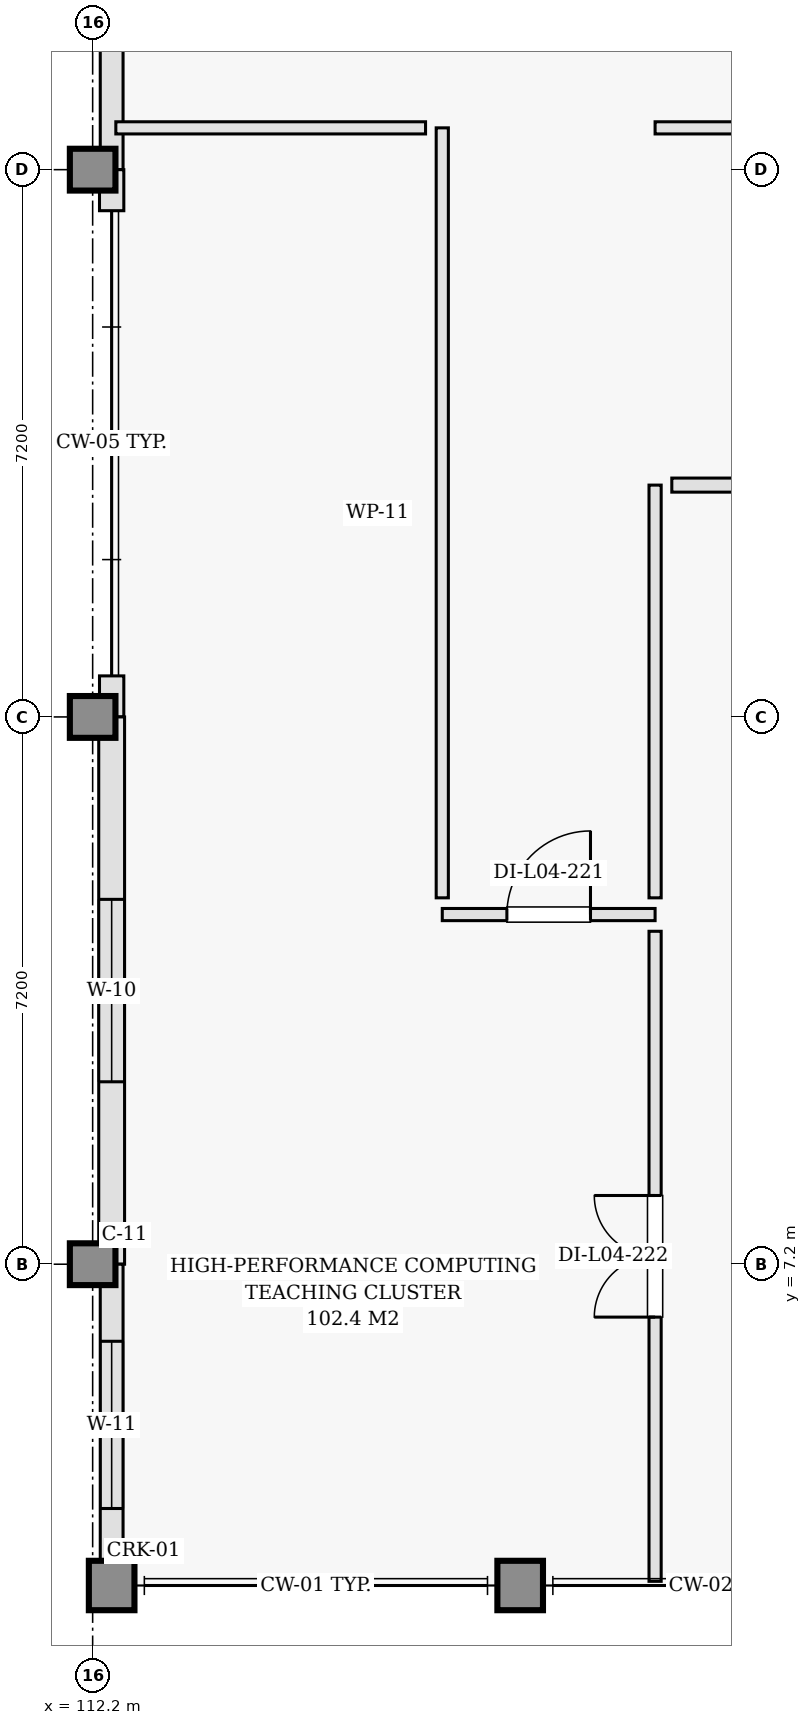
"""IFC4 building model, lengths in metres.
Left out: names, types, materials, properties, quantities, classifications, styles, units other than length and angle.
Written with IfcOpenShell. Run it as: python <this file> out.ifc"""

import sys

from ifc_helpers import new_model, si_unit, direction, frame, frame_2d, origin, origin_2d, place, context, subcontext, project, spatial, rectangle, extrude, element, fill, save


model = new_model("IFC4")
c1 = context("Model", 3, precision=1e-05, world=origin(), true_north=direction((0.0, 1.0)))
c2 = subcontext(c1, "Body", "Model", "MODEL_VIEW")
j1 = project(units=[si_unit("LENGTHUNIT", "METRE"), si_unit("PLANEANGLEUNIT", "RADIAN")], contexts=[c1])
p1 = place(None, origin())
s1 = spatial("IfcSite", under=j1, at=p1, CompositionType="ELEMENT")
p2 = place(p1, origin())
s2 = spatial("IfcBuilding", under=s1, at=p2, CompositionType="ELEMENT")
p3 = place(p2, frame((0.0, 0.0, 18.0)))
s3 = spatial("IfcBuildingStorey", under=s2, at=p3, CompositionType="ELEMENT", Elevation=18.0)
for number, where, z_axis, x_axis in (
    (1, (112.2, 7.2, 0.0), (0.0, 0.0, 1.0), (1.0, 0.0, 0.0)),
    (2, (112.2, 14.4, 0.0), (0.0, 0.0, 1.0), (1.0, 0.0, 0.0)),
    (3, (112.2, 21.6, 0.0), (0.0, 0.0, 1.0), (1.0, 0.0, 0.0)),
):
    element("IfcColumn", number, at=place(p3, frame(where, z_axis=z_axis, x_axis=x_axis)), inside=s3, PredefinedType="COLUMN", context=c2, shape_type="SweptSolid", body=[
        extrude(rectangle(XDim=0.55, YDim=0.55, at=origin_2d()), origin(), (0.0, 0.0, 1.0), 4.2),
    ])
for number, where, z_axis, x_axis in (
    (4, (112.45, 2.973, 0.0), (0.0, -0.272, 0.962), (1.0, 0.0, 0.0)),
    (5, (117.825, 2.973, 0.0), (0.0, -0.272, 0.962), (1.0, 0.0, 0.0)),
):
    element("IfcColumn", number, at=place(p3, frame(where, z_axis=z_axis, x_axis=x_axis)), inside=s3, PredefinedType="USERDEFINED", context=c2, shape_type="SweptSolid", body=[
        extrude(rectangle(XDim=0.45, YDim=0.65, at=origin_2d()), origin(), (0.0, 0.0, 1.0), 4.365),
    ])
p4 = place(p3, frame((112.45, 28.8, 0.0), z_axis=(0.0, 0.0, 1.0), x_axis=(0.0, -1.0, 0.0)))
e6 = element("IfcWall", 6, at=p4, inside=s3, PredefinedType="SOLIDWALL", context=c2, shape_type="SweptSolid", body=[
    extrude(rectangle(XDim=7.2, YDim=0.3, at=frame_2d((3.6, 0.0))), origin(), (0.0, 0.0, 1.0), 3.125),
])
p5 = place(p4, frame((1.5, 0.0, 2.005)))
e7 = element("IfcOpeningElement", 7, at=p5, cuts=e6, PredefinedType="OPENING", context=c2, shape_type="SweptSolid", body=[
    extrude(rectangle(XDim=1.8, YDim=0.9, at=frame_2d((0.9, 0.45))), frame((0.0, 0.16, 0.0), z_axis=(0.0, -1.0, 0.0), x_axis=(1.0, 0.0, 0.0)), (0.0, 0.0, 1.0), 0.32),
])
p6 = place(p4, frame((4.325, 0.0, 2.005)))
e8 = element("IfcOpeningElement", 8, at=p6, cuts=e6, PredefinedType="OPENING", context=c2, shape_type="SweptSolid", body=[
    extrude(rectangle(XDim=0.95, YDim=0.9, at=frame_2d((0.475, 0.45))), frame((0.0, 0.16, 0.0), z_axis=(0.0, -1.0, 0.0), x_axis=(1.0, 0.0, 0.0)), (0.0, 0.0, 1.0), 0.32),
])
for number, where, z_axis, x_axis in (
    (9, (112.45, 21.6, 0.0), (0.0, 0.0, 1.0), (0.0, -1.0, 0.0)),
    (10, (112.45, 14.94, 0.0), (0.0, 0.0, 1.0), (0.0, -1.0, 0.0)),
):
    element("IfcWall", number, at=place(p3, frame(where, z_axis=z_axis, x_axis=x_axis)), inside=s3, PredefinedType="SOLIDWALL", context=c2, shape_type="SweptSolid", body=[
        extrude(rectangle(XDim=0.54, YDim=0.32, at=frame_2d((0.27, 0.0))), origin(), (0.0, 0.0, 1.0), 3.125),
    ])
p7 = place(p3, frame((112.45, 14.4, 0.0), z_axis=(0.0, 0.0, 1.0), x_axis=(0.0, -1.0, 0.0)))
e11 = element("IfcWall", 11, at=p7, inside=s3, PredefinedType="SOLIDWALL", context=c2, shape_type="SweptSolid", body=[
    extrude(rectangle(XDim=7.2, YDim=0.34, at=frame_2d((3.6, 0.0))), origin(), (0.0, 0.0, 1.0), 3.125),
])
p8 = place(p7, frame((2.4, 0.0, 0.85)))
e12 = element("IfcOpeningElement", 12, at=p8, cuts=e11, PredefinedType="OPENING", context=c2, shape_type="SweptSolid", body=[
    extrude(rectangle(XDim=2.4, YDim=2.05, at=frame_2d((1.2, 1.025))), frame((0.0, 0.18, 0.0), z_axis=(0.0, -1.0, 0.0), x_axis=(1.0, 0.0, 0.0)), (0.0, 0.0, 1.0), 0.36),
])
p9 = place(p3, frame((112.45, 7.2, 0.0), z_axis=(0.0, 0.0, 1.0), x_axis=(0.0, -1.0, 0.0)))
e13 = element("IfcWall", 13, at=p9, inside=s3, PredefinedType="SOLIDWALL", context=c2, shape_type="SweptSolid", body=[
    extrude(rectangle(XDim=4.227, YDim=0.3, at=frame_2d((2.114, 0.0))), origin(), (0.0, 0.0, 1.0), 3.425),
])
p10 = place(p9, frame((1.014, 0.0, 0.85)))
e14 = element("IfcOpeningElement", 14, at=p10, cuts=e13, PredefinedType="OPENING", context=c2, shape_type="SweptSolid", body=[
    extrude(rectangle(XDim=2.2, YDim=2.0, at=frame_2d((1.1, 1.0))), frame((0.0, 0.16, 0.0), z_axis=(0.0, -1.0, 0.0), x_axis=(1.0, 0.0, 0.0)), (0.0, 0.0, 1.0), 0.32),
])
p11 = place(p3, frame((116.8, 11.8, 0.0), z_axis=(0.0, 0.0, 1.0), x_axis=(1.0, 0.0, 0.0)))
e15 = element("IfcWall", 15, at=p11, inside=s3, PredefinedType="PARTITIONING", context=c2, shape_type="SweptSolid", body=[
    extrude(rectangle(XDim=2.8, YDim=0.16, at=frame_2d((1.4, 0.0))), origin(), (0.0, 0.0, 1.0), 3.94),
])
p12 = place(p11, frame((0.85, 0.0, 0.0)))
e16 = element("IfcOpeningElement", 16, at=p12, cuts=e15, PredefinedType="OPENING", context=c2, shape_type="SweptSolid", body=[
    extrude(rectangle(XDim=1.1, YDim=2.15, at=frame_2d((0.55, 1.075))), frame((0.0, 0.09, 0.0), z_axis=(0.0, -1.0, 0.0), x_axis=(1.0, 0.0, 0.0)), (0.0, 0.0, 1.0), 0.18),
])
p13 = place(p3, frame((116.8, 12.02, 0.0), z_axis=(0.0, 0.0, 1.0), x_axis=(0.0, 1.0, 0.0)))
e17 = element("IfcWall", 17, at=p13, inside=s3, PredefinedType="PARTITIONING", context=c2, shape_type="SweptSolid", body=[
    extrude(rectangle(XDim=10.13, YDim=0.16, at=frame_2d((5.065, 0.0))), origin(), (0.0, 0.0, 1.0), 3.125),
])
p14 = place(p3, frame((112.505, 22.15, 0.0), z_axis=(0.0, 0.0, 1.0), x_axis=(1.0, 0.0, 0.0)))
e18 = element("IfcWall", 18, at=p14, inside=s3, PredefinedType="PARTITIONING", context=c2, shape_type="SweptSolid", body=[
    extrude(rectangle(XDim=4.075, YDim=0.16, at=frame_2d((2.038, 0.0))), origin(), (0.0, 0.0, 1.0), 3.94),
])
p15 = place(p3, frame((119.6, 3.028, 0.0), z_axis=(0.0, 0.0, 1.0), x_axis=(0.0, 1.0, 0.0)))
e19 = element("IfcWall", 19, at=p15, inside=s3, PredefinedType="PARTITIONING", context=c2, shape_type="SweptSolid", body=[
    extrude(rectangle(XDim=8.552, YDim=0.16, at=frame_2d((4.276, 0.0))), origin(), (0.0, 0.0, 1.0), 3.425),
])
p16 = place(p15, frame((3.476, 0.0, 0.0)))
e20 = element("IfcOpeningElement", 20, at=p16, cuts=e19, PredefinedType="OPENING", context=c2, shape_type="SweptSolid", body=[
    extrude(rectangle(XDim=1.6, YDim=2.2, at=frame_2d((0.8, 1.1))), frame((0.0, 0.09, 0.0), z_axis=(0.0, -1.0, 0.0), x_axis=(1.0, 0.0, 0.0)), (0.0, 0.0, 1.0), 0.18),
])
p17 = place(p3, frame((119.6, 12.02, 0.0), z_axis=(0.0, 0.0, 1.0), x_axis=(0.0, 1.0, 0.0)))
e21 = element("IfcWall", 21, at=p17, inside=s3, PredefinedType="PARTITIONING", context=c2, shape_type="SweptSolid", body=[
    extrude(rectangle(XDim=5.43, YDim=0.16, at=frame_2d((2.715, 0.0))), origin(), (0.0, 0.0, 1.0), 3.125),
])
p18 = place(p3, frame((119.82, 17.45, 0.0), z_axis=(0.0, 0.0, 1.0), x_axis=(1.0, 0.0, 0.0)))
e22 = element("IfcWall", 22, at=p18, inside=s3, PredefinedType="PARTITIONING", context=c2, shape_type="SweptSolid", body=[
    extrude(rectangle(XDim=1.893, YDim=0.185, at=frame_2d((0.946, 0.0))), origin(), (0.0, 0.0, 1.0), 3.275),
])
p19 = place(p3, frame((119.6, 22.15, 0.0), z_axis=(0.0, 0.0, 1.0), x_axis=(1.0, 0.0, 0.0)))
e23 = element("IfcWall", 23, at=p19, inside=s3, PredefinedType="PARTITIONING", context=c2, shape_type="SweptSolid", body=[
    extrude(rectangle(XDim=1.859, YDim=0.16, at=frame_2d((0.929, 0.0))), origin(), (0.0, 0.0, 1.0), 3.275),
])
p20 = place(p8, origin())
e24 = element("IfcWindow", 24, at=p20, inside=s3, PartitioningType="DOUBLE_PANEL_VERTICAL", PredefinedType="WINDOW", context=c2, shape_type="SweptSolid", body=[
    extrude(rectangle(XDim=2.4, YDim=2.05, at=frame_2d((1.2, 1.025))), frame((0.0, 0.03, 0.0), z_axis=(0.0, -1.0, 0.0), x_axis=(1.0, 0.0, 0.0)), (0.0, 0.0, 1.0), 0.06),
])
fill(e12, e24)
p21 = place(p10, origin())
e25 = element("IfcWindow", 25, at=p21, inside=s3, PartitioningType="DOUBLE_PANEL_VERTICAL", PredefinedType="WINDOW", context=c2, shape_type="SweptSolid", body=[
    extrude(rectangle(XDim=2.2, YDim=2.0, at=frame_2d((1.1, 1.0))), frame((0.0, 0.03, 0.0), z_axis=(0.0, -1.0, 0.0), x_axis=(1.0, 0.0, 0.0)), (0.0, 0.0, 1.0), 0.06),
])
fill(e14, e25)
p22 = place(p12, origin())
e26 = element("IfcDoor", 26, at=p22, inside=s3, OperationType="SINGLE_SWING_RIGHT", PredefinedType="DOOR", context=c2, shape_type="SweptSolid", body=[
    extrude(rectangle(XDim=1.1, YDim=2.15, at=frame_2d((0.55, 1.075))), frame((0.0, 0.025, 0.0), z_axis=(0.0, -1.0, 0.0), x_axis=(1.0, 0.0, 0.0)), (0.0, 0.0, 1.0), 0.05),
])
fill(e16, e26)
p23 = place(p16, origin())
e27 = element("IfcDoor", 27, at=p23, inside=s3, OperationType="DOUBLE_DOOR_SINGLE_SWING", PredefinedType="DOOR", context=c2, shape_type="SweptSolid", body=[
    extrude(rectangle(XDim=1.6, YDim=2.2, at=frame_2d((0.8, 1.1))), frame((0.0, 0.025, 0.0), z_axis=(0.0, -1.0, 0.0), x_axis=(1.0, 0.0, 0.0)), (0.0, 0.0, 1.0), 0.05),
])
fill(e20, e27)
save(model, sys.argv[1])
